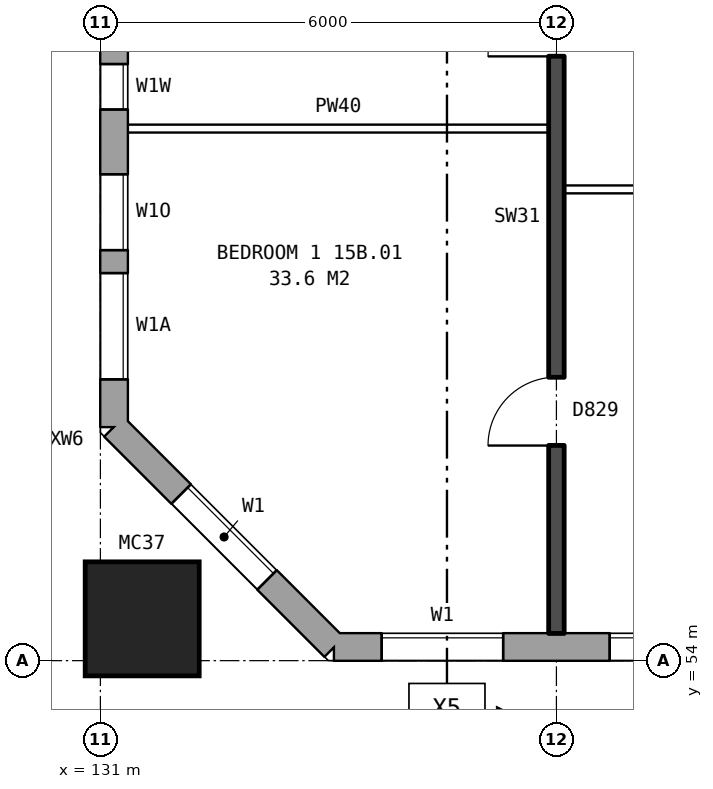
"""IFC4 building model, lengths in metres.
Left out: names, types, materials, properties, quantities, classifications, styles, units other than length and angle.
Written with IfcOpenShell. Run it as: python <this file> out.ifc"""

import sys

from ifc_helpers import new_model, si_unit, direction, frame, frame_2d, origin, origin_2d, place, context, subcontext, project, spatial, rectangle, hollow_rectangle, extrude, element, fill, save


model = new_model("IFC4")
c1 = context("Model", 3, precision=1e-05, world=origin(), true_north=direction((0.0, 1.0)))
c2 = subcontext(c1, "Body", "Model", "MODEL_VIEW")
j1 = project(units=[si_unit("LENGTHUNIT", "METRE"), si_unit("PLANEANGLEUNIT", "RADIAN")], contexts=[c1])
p1 = place(None, origin())
s1 = spatial("IfcSite", under=j1, at=p1, CompositionType="ELEMENT")
p2 = place(p1, origin())
s2 = spatial("IfcBuilding", under=s1, at=p2, CompositionType="ELEMENT")
p3 = place(p2, frame((0.0, 0.0, 56.7)))
s3 = spatial("IfcBuildingStorey", under=s2, at=p3, CompositionType="ELEMENT", Elevation=56.7)
p4 = place(p3, frame((131.55, 54.55, 0.0), z_axis=(0.0, 0.0, 1.0), x_axis=(1.0, 0.0, 0.0)))
e1 = element("IfcColumn", 1, at=p4, inside=s3, PredefinedType="COLUMN", context=c2, shape_type="SweptSolid", body=[
    extrude(hollow_rectangle(XDim=1.5, YDim=1.5, WallThickness=0.08, at=origin_2d()), origin(), (0.0, 0.0, 1.0), 3.1),
])
p5 = place(p3, frame((131.18, 57.075, 0.0), z_axis=(0.0, 0.0, 1.0), x_axis=(0.707106781187, -0.707106781187, 0.0)))
e2 = element("IfcWall", 2, at=p5, inside=s3, PredefinedType="STANDARD", context=c2, shape_type="SweptSolid", body=[
    extrude(rectangle(XDim=4.094, YDim=0.36, at=frame_2d((2.047, 0.0))), origin(), (0.0, 0.0, 1.0), 2.85),
])
p6 = place(p5, frame((1.247, 0.0, 0.8)))
e3 = element("IfcOpeningElement", 3, at=p6, cuts=e2, PredefinedType="OPENING", context=c2, shape_type="SweptSolid", body=[
    extrude(rectangle(XDim=1.6, YDim=1.8, at=frame_2d((0.8, 0.9))), frame((0.0, 0.19, 0.0), z_axis=(0.0, -1.0, 0.0), x_axis=(1.0, 0.0, 0.0)), (0.0, 0.0, 1.0), 0.38),
])
p7 = place(p3, frame((134.075, 54.18, 0.0), z_axis=(0.0, 0.0, 1.0), x_axis=(1.0, 0.0, 0.0)))
e4 = element("IfcWall", 4, at=p7, inside=s3, PredefinedType="STANDARD", context=c2, shape_type="SweptSolid", body=[
    extrude(rectangle(XDim=39.351, YDim=0.36, at=frame_2d((19.675, 0.0))), origin(), (0.0, 0.0, 1.0), 2.85),
])
p8 = place(p7, frame((0.625, 0.0, 0.8)))
e5 = element("IfcOpeningElement", 5, at=p8, cuts=e4, PredefinedType="OPENING", context=c2, shape_type="SweptSolid", body=[
    extrude(rectangle(XDim=1.6, YDim=1.8, at=frame_2d((0.8, 0.9))), frame((0.0, 0.19, 0.0), z_axis=(0.0, -1.0, 0.0), x_axis=(1.0, 0.0, 0.0)), (0.0, 0.0, 1.0), 0.38),
])
p9 = place(p7, frame((3.625, 0.0, 0.8)))
e6 = element("IfcOpeningElement", 6, at=p9, cuts=e4, PredefinedType="OPENING", context=c2, shape_type="SweptSolid", body=[
    extrude(rectangle(XDim=1.6, YDim=1.8, at=frame_2d((0.8, 0.9))), frame((0.0, 0.19, 0.0), z_axis=(0.0, -1.0, 0.0), x_axis=(1.0, 0.0, 0.0)), (0.0, 0.0, 1.0), 0.38),
])
p10 = place(p7, frame((6.625, 0.0, 0.8)))
e7 = element("IfcOpeningElement", 7, at=p10, cuts=e4, PredefinedType="OPENING", context=c2, shape_type="SweptSolid", body=[
    extrude(rectangle(XDim=1.6, YDim=1.8, at=frame_2d((0.8, 0.9))), frame((0.0, 0.19, 0.0), z_axis=(0.0, -1.0, 0.0), x_axis=(1.0, 0.0, 0.0)), (0.0, 0.0, 1.0), 0.38),
])
p11 = place(p7, frame((9.625, 0.0, 0.8)))
e8 = element("IfcOpeningElement", 8, at=p11, cuts=e4, PredefinedType="OPENING", context=c2, shape_type="SweptSolid", body=[
    extrude(rectangle(XDim=1.6, YDim=1.8, at=frame_2d((0.8, 0.9))), frame((0.0, 0.19, 0.0), z_axis=(0.0, -1.0, 0.0), x_axis=(1.0, 0.0, 0.0)), (0.0, 0.0, 1.0), 0.38),
])
p12 = place(p7, frame((12.075, 0.0, 0.8)))
e9 = element("IfcOpeningElement", 9, at=p12, cuts=e4, PredefinedType="OPENING", context=c2, shape_type="SweptSolid", body=[
    extrude(rectangle(XDim=0.8, YDim=1.8, at=frame_2d((0.4, 0.9))), frame((0.0, 0.19, 0.0), z_axis=(0.0, -1.0, 0.0), x_axis=(1.0, 0.0, 0.0)), (0.0, 0.0, 1.0), 0.38),
])
p13 = place(p7, frame((15.275, 0.0, 0.8)))
e10 = element("IfcOpeningElement", 10, at=p13, cuts=e4, PredefinedType="OPENING", context=c2, shape_type="SweptSolid", body=[
    extrude(rectangle(XDim=0.8, YDim=0.9, at=frame_2d((0.4, 0.45))), frame((0.0, 0.19, 0.0), z_axis=(0.0, -1.0, 0.0), x_axis=(1.0, 0.0, 0.0)), (0.0, 0.0, 1.0), 0.38),
])
p14 = place(p7, frame((18.625, 0.0, 0.8)))
e11 = element("IfcOpeningElement", 11, at=p14, cuts=e4, PredefinedType="OPENING", context=c2, shape_type="SweptSolid", body=[
    extrude(rectangle(XDim=1.6, YDim=1.8, at=frame_2d((0.8, 0.9))), frame((0.0, 0.19, 0.0), z_axis=(0.0, -1.0, 0.0), x_axis=(1.0, 0.0, 0.0)), (0.0, 0.0, 1.0), 0.38),
])
p15 = place(p7, frame((21.625, 0.0, 0.8)))
e12 = element("IfcOpeningElement", 12, at=p15, cuts=e4, PredefinedType="OPENING", context=c2, shape_type="SweptSolid", body=[
    extrude(rectangle(XDim=1.6, YDim=1.8, at=frame_2d((0.8, 0.9))), frame((0.0, 0.19, 0.0), z_axis=(0.0, -1.0, 0.0), x_axis=(1.0, 0.0, 0.0)), (0.0, 0.0, 1.0), 0.38),
])
p16 = place(p7, frame((25.275, 0.0, 1.7)))
e13 = element("IfcOpeningElement", 13, at=p16, cuts=e4, PredefinedType="OPENING", context=c2, shape_type="SweptSolid", body=[
    extrude(rectangle(XDim=1.4, YDim=0.9, at=frame_2d((0.7, 0.45))), frame((0.0, 0.19, 0.0), z_axis=(0.0, -1.0, 0.0), x_axis=(1.0, 0.0, 0.0)), (0.0, 0.0, 1.0), 0.38),
])
p17 = place(p7, frame((27.625, 0.0, 0.8)))
e14 = element("IfcOpeningElement", 14, at=p17, cuts=e4, PredefinedType="OPENING", context=c2, shape_type="SweptSolid", body=[
    extrude(rectangle(XDim=1.6, YDim=1.8, at=frame_2d((0.8, 0.9))), frame((0.0, 0.19, 0.0), z_axis=(0.0, -1.0, 0.0), x_axis=(1.0, 0.0, 0.0)), (0.0, 0.0, 1.0), 0.38),
])
p18 = place(p7, frame((30.625, 0.0, 0.8)))
e15 = element("IfcOpeningElement", 15, at=p18, cuts=e4, PredefinedType="OPENING", context=c2, shape_type="SweptSolid", body=[
    extrude(rectangle(XDim=1.6, YDim=1.8, at=frame_2d((0.8, 0.9))), frame((0.0, 0.19, 0.0), z_axis=(0.0, -1.0, 0.0), x_axis=(1.0, 0.0, 0.0)), (0.0, 0.0, 1.0), 0.38),
])
p19 = place(p7, frame((33.625, 0.0, 0.8)))
e16 = element("IfcOpeningElement", 16, at=p19, cuts=e4, PredefinedType="OPENING", context=c2, shape_type="SweptSolid", body=[
    extrude(rectangle(XDim=1.6, YDim=1.8, at=frame_2d((0.8, 0.9))), frame((0.0, 0.19, 0.0), z_axis=(0.0, -1.0, 0.0), x_axis=(1.0, 0.0, 0.0)), (0.0, 0.0, 1.0), 0.38),
])
p20 = place(p7, frame((36.625, 0.0, 0.8)))
e17 = element("IfcOpeningElement", 17, at=p20, cuts=e4, PredefinedType="OPENING", context=c2, shape_type="SweptSolid", body=[
    extrude(rectangle(XDim=1.6, YDim=1.8, at=frame_2d((0.8, 0.9))), frame((0.0, 0.19, 0.0), z_axis=(0.0, -1.0, 0.0), x_axis=(1.0, 0.0, 0.0)), (0.0, 0.0, 1.0), 0.38),
])
p21 = place(p7, frame((13.175, 0.0, 1.7)))
e18 = element("IfcOpeningElement", 18, at=p21, cuts=e4, PredefinedType="OPENING", context=c2, shape_type="SweptSolid", body=[
    extrude(rectangle(XDim=0.8, YDim=0.9, at=frame_2d((0.4, 0.45))), frame((0.0, 0.19, 0.0), z_axis=(0.0, -1.0, 0.0), x_axis=(1.0, 0.0, 0.0)), (0.0, 0.0, 1.0), 0.38),
])
p22 = place(p7, frame((16.375, 0.0, 0.8)))
e19 = element("IfcOpeningElement", 19, at=p22, cuts=e4, PredefinedType="OPENING", context=c2, shape_type="SweptSolid", body=[
    extrude(rectangle(XDim=1.4, YDim=1.8, at=frame_2d((0.7, 0.9))), frame((0.0, 0.19, 0.0), z_axis=(0.0, -1.0, 0.0), x_axis=(1.0, 0.0, 0.0)), (0.0, 0.0, 1.0), 0.38),
])
p23 = place(p3, frame((131.18, 82.925, 0.0), z_axis=(0.0, 0.0, 1.0), x_axis=(0.0, -1.0, 0.0)))
e20 = element("IfcWall", 20, at=p23, inside=s3, PredefinedType="STANDARD", context=c2, shape_type="SweptSolid", body=[
    extrude(rectangle(XDim=25.851, YDim=0.36, at=frame_2d((12.925, 0.0))), origin(), (0.0, 0.0, 1.0), 2.85),
])
p24 = place(p23, frame((1.075, 0.0, 0.8)))
e21 = element("IfcOpeningElement", 21, at=p24, cuts=e20, PredefinedType="OPENING", context=c2, shape_type="SweptSolid", body=[
    extrude(rectangle(XDim=1.2, YDim=1.8, at=frame_2d((0.6, 0.9))), frame((0.0, 0.19, 0.0), z_axis=(0.0, -1.0, 0.0), x_axis=(1.0, 0.0, 0.0)), (0.0, 0.0, 1.0), 0.38),
])
p25 = place(p23, frame((2.575, 0.0, 0.8)))
e22 = element("IfcOpeningElement", 22, at=p25, cuts=e20, PredefinedType="OPENING", context=c2, shape_type="SweptSolid", body=[
    extrude(rectangle(XDim=1.2, YDim=0.9, at=frame_2d((0.6, 0.45))), frame((0.0, 0.19, 0.0), z_axis=(0.0, -1.0, 0.0), x_axis=(1.0, 0.0, 0.0)), (0.0, 0.0, 1.0), 0.38),
])
p26 = place(p23, frame((19.225, 0.0, 1.65)))
e23 = element("IfcOpeningElement", 23, at=p26, cuts=e20, PredefinedType="OPENING", context=c2, shape_type="SweptSolid", body=[
    extrude(rectangle(XDim=1.4, YDim=0.9, at=frame_2d((0.7, 0.45))), frame((0.0, 0.19, 0.0), z_axis=(0.0, -1.0, 0.0), x_axis=(1.0, 0.0, 0.0)), (0.0, 0.0, 1.0), 0.38),
])
p27 = place(p23, frame((22.525, 0.0, 0.8)))
e24 = element("IfcOpeningElement", 24, at=p27, cuts=e20, PredefinedType="OPENING", context=c2, shape_type="SweptSolid", body=[
    extrude(rectangle(XDim=1.0, YDim=1.2, at=frame_2d((0.5, 0.6))), frame((0.0, 0.19, 0.0), z_axis=(0.0, -1.0, 0.0), x_axis=(1.0, 0.0, 0.0)), (0.0, 0.0, 1.0), 0.38),
])
p28 = place(p23, frame((5.025, 0.0, 1.7)))
e25 = element("IfcOpeningElement", 25, at=p28, cuts=e20, PredefinedType="OPENING", context=c2, shape_type="SweptSolid", body=[
    extrude(rectangle(XDim=1.6, YDim=0.9, at=frame_2d((0.8, 0.45))), frame((0.0, 0.19, 0.0), z_axis=(0.0, -1.0, 0.0), x_axis=(1.0, 0.0, 0.0)), (0.0, 0.0, 1.0), 0.38),
])
p29 = place(p23, frame((21.075, 0.0, 0.25)))
e26 = element("IfcOpeningElement", 26, at=p29, cuts=e20, PredefinedType="OPENING", context=c2, shape_type="SweptSolid", body=[
    extrude(rectangle(XDim=0.6, YDim=0.9, at=frame_2d((0.3, 0.45))), frame((0.0, 0.19, 0.0), z_axis=(0.0, -1.0, 0.0), x_axis=(1.0, 0.0, 0.0)), (0.0, 0.0, 1.0), 0.38),
])
p30 = place(p23, frame((23.825, 0.0, 0.8)))
e27 = element("IfcOpeningElement", 27, at=p30, cuts=e20, PredefinedType="OPENING", context=c2, shape_type="SweptSolid", body=[
    extrude(rectangle(XDim=1.4, YDim=1.8, at=frame_2d((0.7, 0.9))), frame((0.0, 0.19, 0.0), z_axis=(0.0, -1.0, 0.0), x_axis=(1.0, 0.0, 0.0)), (0.0, 0.0, 1.0), 0.38),
])
p31 = place(p3, frame((137.1, 60.2, 0.0), z_axis=(0.0, 0.0, 1.0), x_axis=(1.0, 0.0, 0.0)))
e28 = element("IfcWall", 28, at=p31, inside=s3, PredefinedType="PARTITIONING", context=c2, shape_type="SweptSolid", body=[
    extrude(rectangle(XDim=5.8, YDim=0.1, at=frame_2d((2.9, 0.0))), origin(), (0.0, 0.0, 1.0), 2.85),
])
p32 = place(p31, frame((1.3, 0.0, 0.0)))
e29 = element("IfcOpeningElement", 29, at=p32, cuts=e28, PredefinedType="OPENING", context=c2, shape_type="SweptSolid", body=[
    extrude(rectangle(XDim=0.9, YDim=2.1, at=frame_2d((0.45, 1.05))), frame((0.0, 0.06, 0.0), z_axis=(0.0, -1.0, 0.0), x_axis=(1.0, 0.0, 0.0)), (0.0, 0.0, 1.0), 0.12),
])
p33 = place(p31, frame((4.2, 0.0, 0.0)))
e30 = element("IfcOpeningElement", 30, at=p33, cuts=e28, PredefinedType="OPENING", context=c2, shape_type="SweptSolid", body=[
    extrude(rectangle(XDim=0.9, YDim=2.1, at=frame_2d((0.45, 1.05))), frame((0.0, 0.06, 0.0), z_axis=(0.0, -1.0, 0.0), x_axis=(1.0, 0.0, 0.0)), (0.0, 0.0, 1.0), 0.12),
])
p34 = place(p3, frame((131.36, 61.0, 0.0), z_axis=(0.0, 0.0, 1.0), x_axis=(1.0, 0.0, 0.0)))
e31 = element("IfcWall", 31, at=p34, inside=s3, PredefinedType="PARTITIONING", context=c2, shape_type="SweptSolid", body=[
    extrude(rectangle(XDim=5.54, YDim=0.1, at=frame_2d((2.77, 0.0))), origin(), (0.0, 0.0, 1.0), 2.85),
])
p35 = place(p3, frame((137.0, 54.36, 0.0), z_axis=(0.0, 0.0, 1.0), x_axis=(0.0, 1.0, 0.0)))
e32 = element("IfcWall", 32, at=p35, inside=s3, PredefinedType="SOLIDWALL", context=c2, shape_type="SweptSolid", body=[
    extrude(rectangle(XDim=9.44, YDim=0.2, at=frame_2d((4.72, 0.0))), origin(), (0.0, 0.0, 1.0), 2.85),
])
p36 = place(p35, frame((2.47, 0.0, 0.0)))
e33 = element("IfcOpeningElement", 33, at=p36, cuts=e32, PredefinedType="OPENING", context=c2, shape_type="SweptSolid", body=[
    extrude(rectangle(XDim=0.9, YDim=2.1, at=frame_2d((0.45, 1.05))), frame((0.0, 0.11, 0.0), z_axis=(0.0, -1.0, 0.0), x_axis=(1.0, 0.0, 0.0)), (0.0, 0.0, 1.0), 0.22),
])
p37 = place(p35, frame((7.59, 0.0, 0.0)))
e34 = element("IfcOpeningElement", 34, at=p37, cuts=e32, PredefinedType="OPENING", context=c2, shape_type="SweptSolid", body=[
    extrude(rectangle(XDim=0.9, YDim=2.1, at=frame_2d((0.45, 1.05))), frame((0.0, 0.11, 0.0), z_axis=(0.0, -1.0, 0.0), x_axis=(1.0, 0.0, 0.0)), (0.0, 0.0, 1.0), 0.22),
])
p38 = place(p6, origin())
e35 = element("IfcWindow", 35, at=p38, inside=s3, PartitioningType="SINGLE_PANEL", PredefinedType="WINDOW", context=c2, shape_type="SweptSolid", body=[
    extrude(rectangle(XDim=1.6, YDim=1.8, at=frame_2d((0.8, 0.9))), frame((0.0, 0.15, 0.0), z_axis=(0.0, -1.0, 0.0), x_axis=(1.0, 0.0, 0.0)), (0.0, 0.0, 1.0), 0.06),
])
fill(e3, e35)
p39 = place(p8, origin())
e36 = element("IfcWindow", 36, at=p39, inside=s3, PartitioningType="SINGLE_PANEL", PredefinedType="WINDOW", context=c2, shape_type="SweptSolid", body=[
    extrude(rectangle(XDim=1.6, YDim=1.8, at=frame_2d((0.8, 0.9))), frame((0.0, 0.15, 0.0), z_axis=(0.0, -1.0, 0.0), x_axis=(1.0, 0.0, 0.0)), (0.0, 0.0, 1.0), 0.06),
])
fill(e5, e36)
p40 = place(p9, origin())
e37 = element("IfcWindow", 37, at=p40, inside=s3, PartitioningType="SINGLE_PANEL", PredefinedType="WINDOW", context=c2, shape_type="SweptSolid", body=[
    extrude(rectangle(XDim=1.6, YDim=1.8, at=frame_2d((0.8, 0.9))), frame((0.0, 0.15, 0.0), z_axis=(0.0, -1.0, 0.0), x_axis=(1.0, 0.0, 0.0)), (0.0, 0.0, 1.0), 0.06),
])
fill(e6, e37)
p41 = place(p27, origin())
e38 = element("IfcWindow", 38, at=p41, inside=s3, PartitioningType="SINGLE_PANEL", PredefinedType="WINDOW", context=c2, shape_type="SweptSolid", body=[
    extrude(rectangle(XDim=1.0, YDim=1.2, at=frame_2d((0.5, 0.6))), frame((0.0, 0.15, 0.0), z_axis=(0.0, -1.0, 0.0), x_axis=(1.0, 0.0, 0.0)), (0.0, 0.0, 1.0), 0.06),
])
fill(e24, e38)
p42 = place(p36, origin())
e39 = element("IfcDoor", 39, at=p42, inside=s3, OperationType="SINGLE_SWING_LEFT", PredefinedType="DOOR", context=c2, shape_type="SweptSolid", body=[
    extrude(rectangle(XDim=0.9, YDim=2.1, at=frame_2d((0.45, 1.05))), frame((0.0, 0.025, 0.0), z_axis=(0.0, -1.0, 0.0), x_axis=(1.0, 0.0, 0.0)), (0.0, 0.0, 1.0), 0.05),
])
fill(e33, e39)
p43 = place(p37, origin())
e40 = element("IfcDoor", 40, at=p43, inside=s3, OperationType="SINGLE_SWING_LEFT", PredefinedType="DOOR", context=c2, shape_type="SweptSolid", body=[
    extrude(rectangle(XDim=0.9, YDim=2.1, at=frame_2d((0.45, 1.05))), frame((0.0, 0.025, 0.0), z_axis=(0.0, -1.0, 0.0), x_axis=(1.0, 0.0, 0.0)), (0.0, 0.0, 1.0), 0.05),
])
fill(e34, e40)
p44 = place(p29, origin())
e41 = element("IfcWindow", 41, at=p44, inside=s3, PartitioningType="SINGLE_PANEL", PredefinedType="WINDOW", context=c2, shape_type="SweptSolid", body=[
    extrude(rectangle(XDim=0.6, YDim=0.9, at=frame_2d((0.3, 0.45))), frame((0.0, 0.15, 0.0), z_axis=(0.0, -1.0, 0.0), x_axis=(1.0, 0.0, 0.0)), (0.0, 0.0, 1.0), 0.06),
])
fill(e26, e41)
p45 = place(p30, origin())
e42 = element("IfcWindow", 42, at=p45, inside=s3, PartitioningType="SINGLE_PANEL", PredefinedType="WINDOW", context=c2, shape_type="SweptSolid", body=[
    extrude(rectangle(XDim=1.4, YDim=1.8, at=frame_2d((0.7, 0.9))), frame((0.0, 0.15, 0.0), z_axis=(0.0, -1.0, 0.0), x_axis=(1.0, 0.0, 0.0)), (0.0, 0.0, 1.0), 0.06),
])
fill(e27, e42)
save(model, sys.argv[1])
